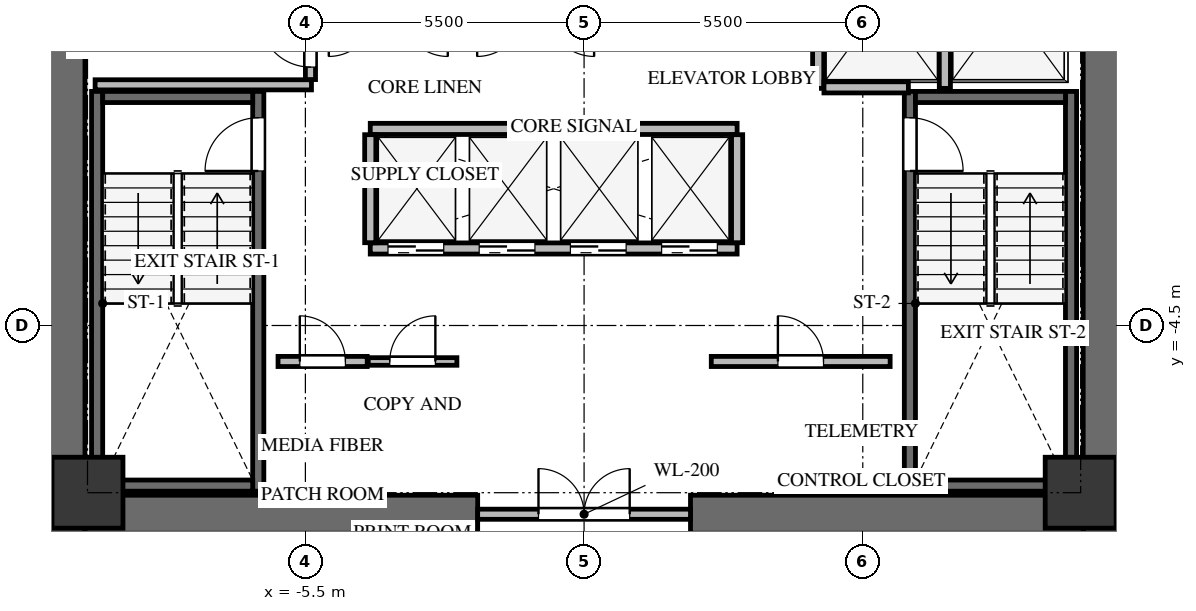
"""IFC4 building model, lengths in metres.
Left out: names, types, materials, properties, quantities, classifications, styles, units other than length and angle.
Written with IfcOpenShell. Run it as: python <this file> out.ifc"""

import sys

from ifc_helpers import new_model, si_unit, direction, frame, frame_2d, origin, origin_2d, place, context, subcontext, project, spatial, rectangle, extrude, source, transform, mapped, element, fill, save


model = new_model("IFC4")
c1 = context("Model", 3, precision=1e-05, world=origin(), true_north=direction((0.0, 1.0)))
c2 = subcontext(c1, "Body", "Model", "MODEL_VIEW")
j1 = project(units=[si_unit("LENGTHUNIT", "METRE"), si_unit("PLANEANGLEUNIT", "RADIAN")], contexts=[c1])
p1 = place(None, origin())
s1 = spatial("IfcSite", under=j1, at=p1, CompositionType="ELEMENT")
p2 = place(p1, origin())
s2 = spatial("IfcBuilding", under=s1, at=p2, CompositionType="ELEMENT")
p3 = place(p2, frame((0.0, 0.0, 97.5)))
s3 = spatial("IfcBuildingStorey", under=s2, at=p3, CompositionType="ELEMENT", Elevation=97.5)
for number, where, z_axis, x_axis in (
    (1, (-10.225, -8.6, 0.0), (0.0, 0.0, 1.0), (0.0, 1.0, 0.0)),
    (2, (10.225, -8.6, 0.0), (0.0, 0.0, 1.0), (0.0, 1.0, 0.0)),
):
    element("IfcWall", number, at=place(p3, frame(where, z_axis=z_axis, x_axis=x_axis)), inside=s3, PredefinedType="SHEAR", context=c2, shape_type="SweptSolid", body=[
        extrude(rectangle(XDim=17.2, YDim=0.75, at=frame_2d((8.6, 0.0))), origin(), (0.0, 0.0, 1.0), 3.3),
    ])
for number, where, z_axis, x_axis in (
    (3, (-9.85, -8.225, 0.0), (0.0, 0.0, 1.0), (1.0, 0.0, 0.0)),
    (4, (2.1, -8.225, 0.0), (0.0, 0.0, 1.0), (1.0, 0.0, 0.0)),
):
    element("IfcWall", number, at=place(p3, frame(where, z_axis=z_axis, x_axis=x_axis)), inside=s3, PredefinedType="SHEAR", context=c2, shape_type="SweptSolid", body=[
        extrude(rectangle(XDim=7.75, YDim=0.75, at=frame_2d((3.875, 0.0))), origin(), (0.0, 0.0, 1.0), 3.3),
    ])
p4 = place(p3, frame((-6.43, -7.77, -0.24), z_axis=(0.0, 0.0, 1.0), x_axis=(0.0, 1.0, 0.0)))
e5 = element("IfcWall", 5, at=p4, inside=s3, PredefinedType="SHEAR", context=c2, shape_type="SweptSolid", body=[
    extrude(rectangle(XDim=7.89, YDim=0.22, at=frame_2d((3.945, 0.0))), origin(), (0.0, 0.0, 1.0), 3.3),
])
p5 = place(p4, frame((6.32, 0.0, 0.0)))
e6 = element("IfcOpeningElement", 6, at=p5, cuts=e5, PredefinedType="OPENING", context=c2, shape_type="SweptSolid", body=[
    extrude(rectangle(XDim=1.05, YDim=2.15, at=frame_2d((0.525, 1.075))), frame((0.0, 0.12, 0.0), z_axis=(0.0, -1.0, 0.0), x_axis=(1.0, 0.0, 0.0)), (0.0, 0.0, 1.0), 0.24),
])
p6 = place(p3, frame((-9.61, 0.12, -0.24), z_axis=(0.0, 0.0, 1.0), x_axis=(0.0, -1.0, 0.0)))
e7 = element("IfcWall", 7, at=p6, inside=s3, PredefinedType="SHEAR", context=c2, shape_type="SweptSolid", body=[
    extrude(rectangle(XDim=7.89, YDim=0.22, at=frame_2d((3.945, 0.0))), origin(), (0.0, 0.0, 1.0), 3.3),
])
for number, where, z_axis, x_axis in (
    (8, (-9.5, -7.66, -0.24), (0.0, 0.0, 1.0), (1.0, 0.0, 0.0)),
    (9, (-6.54, 0.01, -0.24), (0.0, 0.0, 1.0), (-1.0, 0.0, 0.0)),
):
    element("IfcWall", number, at=place(p3, frame(where, z_axis=z_axis, x_axis=x_axis)), inside=s3, PredefinedType="SHEAR", context=c2, shape_type="SweptSolid", body=[
        extrude(rectangle(XDim=2.96, YDim=0.22, at=frame_2d((1.48, 0.0))), origin(), (0.0, 0.0, 1.0), 3.3),
    ])
p7 = place(p3, frame((9.61, -7.77, -0.24), z_axis=(0.0, 0.0, 1.0), x_axis=(0.0, 1.0, 0.0)))
e10 = element("IfcWall", 10, at=p7, inside=s3, PredefinedType="SHEAR", context=c2, shape_type="SweptSolid", body=[
    extrude(rectangle(XDim=7.89, YDim=0.22, at=frame_2d((3.945, 0.0))), origin(), (0.0, 0.0, 1.0), 3.3),
])
p8 = place(p3, frame((6.43, 0.12, -0.24), z_axis=(0.0, 0.0, 1.0), x_axis=(0.0, -1.0, 0.0)))
e11 = element("IfcWall", 11, at=p8, inside=s3, PredefinedType="SHEAR", context=c2, shape_type="SweptSolid", body=[
    extrude(rectangle(XDim=7.89, YDim=0.22, at=frame_2d((3.945, 0.0))), origin(), (0.0, 0.0, 1.0), 3.3),
])
p9 = place(p8, frame((0.52, 0.0, 0.0)))
e12 = element("IfcOpeningElement", 12, at=p9, cuts=e11, PredefinedType="OPENING", context=c2, shape_type="SweptSolid", body=[
    extrude(rectangle(XDim=1.05, YDim=2.15, at=frame_2d((0.525, 1.075))), frame((0.0, 0.12, 0.0), z_axis=(0.0, -1.0, 0.0), x_axis=(1.0, 0.0, 0.0)), (0.0, 0.0, 1.0), 0.24),
])
for number, where, z_axis, x_axis in (
    (13, (6.54, -7.66, -0.24), (0.0, 0.0, 1.0), (1.0, 0.0, 0.0)),
    (14, (9.5, 0.01, -0.24), (0.0, 0.0, 1.0), (-1.0, 0.0, 0.0)),
):
    element("IfcWall", number, at=place(p3, frame(where, z_axis=z_axis, x_axis=x_axis)), inside=s3, PredefinedType="SHEAR", context=c2, shape_type="SweptSolid", body=[
        extrude(rectangle(XDim=2.96, YDim=0.22, at=frame_2d((1.48, 0.0))), origin(), (0.0, 0.0, 1.0), 3.3),
    ])
m1 = source(origin(), c2, "Body", "SweptSolid", [
    extrude(rectangle(XDim=1.4, YDim=1.4, at=origin_2d()), origin(), (0.0, 0.0, 1.0), 3.3),
])
for number, where, z_axis, x_axis in (
    (15, (-9.8, -7.8, -0.24), (0.0, 0.0, 1.0), (1.0, 0.0, 0.0)),
    (16, (9.8, -7.8, -0.24), (0.0, 0.0, 1.0), (1.0, 0.0, 0.0)),
):
    element("IfcColumn", number, at=place(p3, frame(where, z_axis=z_axis, x_axis=x_axis)), inside=s3, PredefinedType="COLUMN", context=c2, shape_type="MappedRepresentation", body=[
        mapped(m1, transform((0.0, 0.0, 0.0), x_axis=(1.0, 0.0, 0.0), y_axis=(0.0, 1.0, 0.0), z_axis=(0.0, 0.0, 1.0), scale=1.0)),
    ])
p10 = place(p3, frame((-2.1, -8.225, 0.0), z_axis=(0.0, 0.0, 1.0), x_axis=(1.0, 0.0, 0.0)))
e17 = element("IfcWall", 17, at=p10, inside=s3, PredefinedType="SOLIDWALL", context=c2, shape_type="SweptSolid", body=[
    extrude(rectangle(XDim=4.2, YDim=0.2, at=frame_2d((2.1, 0.0))), origin(), (0.0, 0.0, 1.0), 3.045),
])
p11 = place(p10, frame((1.2, 0.0, 0.0)))
e18 = element("IfcOpeningElement", 18, at=p11, cuts=e17, PredefinedType="OPENING", context=c2, shape_type="SweptSolid", body=[
    extrude(rectangle(XDim=1.8, YDim=2.15, at=frame_2d((0.9, 1.075))), frame((0.0, 0.11, 0.0), z_axis=(0.0, -1.0, 0.0), x_axis=(1.0, 0.0, 0.0)), (0.0, 0.0, 1.0), 0.22),
])
p12 = place(p3, frame((-9.65, 0.25, 0.0), z_axis=(0.0, 0.0, 1.0), x_axis=(1.0, 0.0, 0.0)))
e19 = element("IfcWall", 19, at=p12, inside=s3, PredefinedType="SOLIDWALL", context=c2, shape_type="SweptSolid", body=[
    extrude(rectangle(XDim=4.27, YDim=0.2, at=frame_2d((2.135, 0.0))), origin(), (0.0, 0.0, 1.0), 3.045),
])
p13 = place(p3, frame((-5.4, 0.354, 0.0), z_axis=(0.0, 0.0, 1.0), x_axis=(0.0, 1.0, 0.0)))
e20 = element("IfcWall", 20, at=p13, inside=s3, PredefinedType="SOLIDWALL", context=c2, shape_type="SweptSolid", body=[
    extrude(rectangle(XDim=4.026, YDim=0.2, at=frame_2d((2.013, 0.0))), origin(), (0.0, 0.0, 1.0), 3.045),
])
p14 = place(p13, frame((0.246, 0.0, 0.0)))
e21 = element("IfcOpeningElement", 21, at=p14, cuts=e20, PredefinedType="OPENING", context=c2, shape_type="SweptSolid", body=[
    extrude(rectangle(XDim=1.0, YDim=2.15, at=frame_2d((0.5, 1.075))), frame((0.0, 0.11, 0.0), z_axis=(0.0, -1.0, 0.0), x_axis=(1.0, 0.0, 0.0)), (0.0, 0.0, 1.0), 0.22),
])
for number, where, z_axis, x_axis in (
    (22, (4.62, 0.18, 0.0), (0.0, 0.0, 1.0), (0.0, 1.0, 0.0)),
    (23, (7.12, 0.18, 0.0), (0.0, 0.0, 1.0), (0.0, 1.0, 0.0)),
):
    element("IfcWall", number, at=place(p3, frame(where, z_axis=z_axis, x_axis=x_axis)), inside=s3, PredefinedType="SOLIDWALL", context=c2, shape_type="SweptSolid", body=[
        extrude(rectangle(XDim=3.186, YDim=0.22, at=frame_2d((1.593, 0.0))), origin(), (0.0, 0.0, 1.0), 3.045),
    ])
p15 = place(p3, frame((4.734, 0.2, 0.0), z_axis=(0.0, 0.0, 1.0), x_axis=(1.0, 0.0, 0.0)))
e24 = element("IfcWall", 24, at=p15, inside=s3, PredefinedType="SOLIDWALL", context=c2, shape_type="SweptSolid", body=[
    extrude(rectangle(XDim=1.666, YDim=0.22, at=frame_2d((0.833, 0.0))), origin(), (0.0, 0.0, 1.0), 3.045),
])
p16 = place(p3, frame((-4.22, -2.98, 0.0), z_axis=(0.0, 0.0, 1.0), x_axis=(1.0, 0.0, 0.0)))
e25 = element("IfcWall", 25, at=p16, inside=s3, PredefinedType="SOLIDWALL", context=c2, shape_type="SweptSolid", body=[
    extrude(rectangle(XDim=7.24, YDim=0.22, at=frame_2d((3.62, 0.0))), origin(), (0.0, 0.0, 1.0), 3.045),
])
p17 = place(p16, frame((0.35, 0.0, 0.0)))
e26 = element("IfcOpeningElement", 26, at=p17, cuts=e25, PredefinedType="OPENING", context=c2, shape_type="SweptSolid", body=[
    extrude(rectangle(XDim=1.1, YDim=2.15, at=frame_2d((0.55, 1.075))), frame((0.0, 0.12, 0.0), z_axis=(0.0, -1.0, 0.0), x_axis=(1.0, 0.0, 0.0)), (0.0, 0.0, 1.0), 0.24),
])
p18 = place(p16, frame((2.15, 0.0, 0.0)))
e27 = element("IfcOpeningElement", 27, at=p18, cuts=e25, PredefinedType="OPENING", context=c2, shape_type="SweptSolid", body=[
    extrude(rectangle(XDim=1.1, YDim=2.15, at=frame_2d((0.55, 1.075))), frame((0.0, 0.12, 0.0), z_axis=(0.0, -1.0, 0.0), x_axis=(1.0, 0.0, 0.0)), (0.0, 0.0, 1.0), 0.24),
])
p19 = place(p16, frame((3.95, 0.0, 0.0)))
e28 = element("IfcOpeningElement", 28, at=p19, cuts=e25, PredefinedType="OPENING", context=c2, shape_type="SweptSolid", body=[
    extrude(rectangle(XDim=1.1, YDim=2.15, at=frame_2d((0.55, 1.075))), frame((0.0, 0.12, 0.0), z_axis=(0.0, -1.0, 0.0), x_axis=(1.0, 0.0, 0.0)), (0.0, 0.0, 1.0), 0.24),
])
p20 = place(p16, frame((5.75, 0.0, 0.0)))
e29 = element("IfcOpeningElement", 29, at=p20, cuts=e25, PredefinedType="OPENING", context=c2, shape_type="SweptSolid", body=[
    extrude(rectangle(XDim=1.1, YDim=2.15, at=frame_2d((0.55, 1.075))), frame((0.0, 0.12, 0.0), z_axis=(0.0, -1.0, 0.0), x_axis=(1.0, 0.0, 0.0)), (0.0, 0.0, 1.0), 0.24),
])
p21 = place(p3, frame((-4.22, -0.62, 0.0), z_axis=(0.0, 0.0, 1.0), x_axis=(1.0, 0.0, 0.0)))
e30 = element("IfcWall", 30, at=p21, inside=s3, PredefinedType="SOLIDWALL", context=c2, shape_type="SweptSolid", body=[
    extrude(rectangle(XDim=7.24, YDim=0.22, at=frame_2d((3.62, 0.0))), origin(), (0.0, 0.0, 1.0), 3.045),
])
for number, where, z_axis, x_axis in (
    (31, (-4.22, -2.866, 0.0), (0.0, 0.0, 1.0), (0.0, 1.0, 0.0)),
    (32, (3.02, -2.866, 0.0), (0.0, 0.0, 1.0), (0.0, 1.0, 0.0)),
):
    element("IfcWall", number, at=place(p3, frame(where, z_axis=z_axis, x_axis=x_axis)), inside=s3, PredefinedType="SOLIDWALL", context=c2, shape_type="SweptSolid", body=[
        extrude(rectangle(XDim=2.132, YDim=0.22, at=frame_2d((1.066, 0.0))), origin(), (0.0, 0.0, 1.0), 3.045),
    ])
p22 = place(p3, frame((-6.04, -5.21, 0.0), z_axis=(0.0, 0.0, 1.0), x_axis=(1.0, 0.0, 0.0)))
e33 = element("IfcWall", 33, at=p22, inside=s3, PredefinedType="SOLIDWALL", context=c2, shape_type="SweptSolid", body=[
    extrude(rectangle(XDim=1.76, YDim=0.2, at=frame_2d((0.88, 0.0))), origin(), (0.0, 0.0, 1.0), 3.045),
])
p23 = place(p22, frame((0.43, 0.0, 0.0)))
e34 = element("IfcOpeningElement", 34, at=p23, cuts=e33, PredefinedType="OPENING", context=c2, shape_type="SweptSolid", body=[
    extrude(rectangle(XDim=0.9, YDim=2.05, at=frame_2d((0.45, 1.025))), frame((0.0, 0.11, 0.0), z_axis=(0.0, -1.0, 0.0), x_axis=(1.0, 0.0, 0.0)), (0.0, 0.0, 1.0), 0.22),
])
p24 = place(p3, frame((-4.26, -5.21, 0.0), z_axis=(0.0, 0.0, 1.0), x_axis=(1.0, 0.0, 0.0)))
e35 = element("IfcWall", 35, at=p24, inside=s3, PredefinedType="PARTITIONING", context=c2, shape_type="SweptSolid", body=[
    extrude(rectangle(XDim=1.75, YDim=0.15, at=frame_2d((0.875, 0.0))), origin(), (0.0, 0.0, 1.0), 3.045),
])
p25 = place(p24, frame((0.425, 0.0, 0.0)))
e36 = element("IfcOpeningElement", 36, at=p25, cuts=e35, PredefinedType="OPENING", context=c2, shape_type="SweptSolid", body=[
    extrude(rectangle(XDim=0.9, YDim=2.05, at=frame_2d((0.45, 1.025))), frame((0.0, 0.085, 0.0), z_axis=(0.0, -1.0, 0.0), x_axis=(1.0, 0.0, 0.0)), (0.0, 0.0, 1.0), 0.17),
])
p26 = place(p3, frame((2.51, -5.21, 0.0), z_axis=(0.0, 0.0, 1.0), x_axis=(1.0, 0.0, 0.0)))
e37 = element("IfcWall", 37, at=p26, inside=s3, PredefinedType="SOLIDWALL", context=c2, shape_type="SweptSolid", body=[
    extrude(rectangle(XDim=3.53, YDim=0.2, at=frame_2d((1.765, 0.0))), origin(), (0.0, 0.0, 1.0), 3.045),
])
p27 = place(p26, frame((1.315, 0.0, 0.0)))
e38 = element("IfcOpeningElement", 38, at=p27, cuts=e37, PredefinedType="OPENING", context=c2, shape_type="SweptSolid", body=[
    extrude(rectangle(XDim=0.9, YDim=2.05, at=frame_2d((0.45, 1.025))), frame((0.0, 0.11, 0.0), z_axis=(0.0, -1.0, 0.0), x_axis=(1.0, 0.0, 0.0)), (0.0, 0.0, 1.0), 0.22),
])
m2 = source(origin(), c2, "Body", "SweptSolid", [
    extrude(rectangle(XDim=1.05, YDim=2.15, at=frame_2d((0.525, 1.075))), frame((0.0, 0.025, 0.0), z_axis=(0.0, -1.0, 0.0), x_axis=(1.0, 0.0, 0.0)), (0.0, 0.0, 1.0), 0.05),
])
p28 = place(p5, origin())
e39 = element("IfcDoor", 39, at=p28, inside=s3, OperationType="SINGLE_SWING_LEFT", PredefinedType="DOOR", context=c2, shape_type="MappedRepresentation", body=[
    mapped(m2, transform((0.0, 0.0, 0.0), x_axis=(1.0, 0.0, 0.0), y_axis=(0.0, 1.0, 0.0), z_axis=(0.0, 0.0, 1.0), scale=1.0)),
])
fill(e6, e39)
m3 = source(origin(), c2, "Body", "SweptSolid", [
    extrude(rectangle(XDim=1.05, YDim=2.15, at=frame_2d((0.525, 1.075))), frame((0.0, 0.025, 0.0), z_axis=(0.0, -1.0, 0.0), x_axis=(1.0, 0.0, 0.0)), (0.0, 0.0, 1.0), 0.05),
])
p29 = place(p9, origin())
e40 = element("IfcDoor", 40, at=p29, inside=s3, OperationType="SINGLE_SWING_RIGHT", PredefinedType="DOOR", context=c2, shape_type="MappedRepresentation", body=[
    mapped(m3, transform((0.0, 0.0, 0.0), x_axis=(1.0, 0.0, 0.0), y_axis=(0.0, 1.0, 0.0), z_axis=(0.0, 0.0, 1.0), scale=1.0)),
])
fill(e12, e40)
m4 = source(origin(), c2, "Body", "SweptSolid", [
    extrude(rectangle(XDim=1.8, YDim=2.15, at=frame_2d((0.9, 1.075))), frame((0.0, 0.025, 0.0), z_axis=(0.0, -1.0, 0.0), x_axis=(1.0, 0.0, 0.0)), (0.0, 0.0, 1.0), 0.05),
])
p30 = place(p11, origin())
e41 = element("IfcDoor", 41, at=p30, inside=s3, OperationType="DOUBLE_DOOR_SINGLE_SWING", PredefinedType="DOOR", context=c2, shape_type="MappedRepresentation", body=[
    mapped(m4, transform((0.0, 0.0, 0.0), x_axis=(1.0, 0.0, 0.0), y_axis=(0.0, 1.0, 0.0), z_axis=(0.0, 0.0, 1.0), scale=1.0)),
])
fill(e18, e41)
m5 = source(origin(), c2, "Body", "SweptSolid", [
    extrude(rectangle(XDim=1.0, YDim=2.15, at=frame_2d((0.5, 1.075))), frame((0.0, 0.025, 0.0), z_axis=(0.0, -1.0, 0.0), x_axis=(1.0, 0.0, 0.0)), (0.0, 0.0, 1.0), 0.05),
])
p31 = place(p14, origin())
e42 = element("IfcDoor", 42, at=p31, inside=s3, OperationType="SINGLE_SWING_RIGHT", PredefinedType="DOOR", context=c2, shape_type="MappedRepresentation", body=[
    mapped(m5, transform((0.0, 0.0, 0.0), x_axis=(1.0, 0.0, 0.0), y_axis=(0.0, 1.0, 0.0), z_axis=(0.0, 0.0, 1.0), scale=1.0)),
])
fill(e21, e42)
m6 = source(origin(), c2, "Body", "SweptSolid", [
    extrude(rectangle(XDim=1.1, YDim=2.15, at=frame_2d((0.55, 1.075))), frame((0.0, 0.025, 0.0), z_axis=(0.0, -1.0, 0.0), x_axis=(1.0, 0.0, 0.0)), (0.0, 0.0, 1.0), 0.05),
])
p32 = place(p17, origin())
e43 = element("IfcDoor", 43, at=p32, inside=s3, OperationType="DOUBLE_DOOR_SLIDING", PredefinedType="DOOR", context=c2, shape_type="MappedRepresentation", body=[
    mapped(m6, transform((0.0, 0.0, 0.0), x_axis=(1.0, 0.0, 0.0), y_axis=(0.0, 1.0, 0.0), z_axis=(0.0, 0.0, 1.0), scale=1.0)),
])
fill(e26, e43)
p33 = place(p18, origin())
e44 = element("IfcDoor", 44, at=p33, inside=s3, OperationType="DOUBLE_DOOR_SLIDING", PredefinedType="DOOR", context=c2, shape_type="MappedRepresentation", body=[
    mapped(m6, transform((0.0, 0.0, 0.0), x_axis=(1.0, 0.0, 0.0), y_axis=(0.0, 1.0, 0.0), z_axis=(0.0, 0.0, 1.0), scale=1.0)),
])
fill(e27, e44)
p34 = place(p19, origin())
e45 = element("IfcDoor", 45, at=p34, inside=s3, OperationType="DOUBLE_DOOR_SLIDING", PredefinedType="DOOR", context=c2, shape_type="MappedRepresentation", body=[
    mapped(m6, transform((0.0, 0.0, 0.0), x_axis=(1.0, 0.0, 0.0), y_axis=(0.0, 1.0, 0.0), z_axis=(0.0, 0.0, 1.0), scale=1.0)),
])
fill(e28, e45)
p35 = place(p20, origin())
e46 = element("IfcDoor", 46, at=p35, inside=s3, OperationType="DOUBLE_DOOR_SLIDING", PredefinedType="DOOR", context=c2, shape_type="MappedRepresentation", body=[
    mapped(m6, transform((0.0, 0.0, 0.0), x_axis=(1.0, 0.0, 0.0), y_axis=(0.0, 1.0, 0.0), z_axis=(0.0, 0.0, 1.0), scale=1.0)),
])
fill(e29, e46)
m7 = source(origin(), c2, "Body", "SweptSolid", [
    extrude(rectangle(XDim=0.9, YDim=2.05, at=frame_2d((0.45, 1.025))), frame((0.0, 0.025, 0.0), z_axis=(0.0, -1.0, 0.0), x_axis=(1.0, 0.0, 0.0)), (0.0, 0.0, 1.0), 0.05),
])
p36 = place(p23, origin())
e47 = element("IfcDoor", 47, at=p36, inside=s3, OperationType="SINGLE_SWING_LEFT", PredefinedType="DOOR", context=c2, shape_type="MappedRepresentation", body=[
    mapped(m7, transform((0.0, 0.0, 0.0), x_axis=(1.0, 0.0, 0.0), y_axis=(0.0, 1.0, 0.0), z_axis=(0.0, 0.0, 1.0), scale=1.0)),
])
fill(e34, e47)
m8 = source(origin(), c2, "Body", "SweptSolid", [
    extrude(rectangle(XDim=0.9, YDim=2.05, at=frame_2d((0.45, 1.025))), frame((0.0, 0.025, 0.0), z_axis=(0.0, -1.0, 0.0), x_axis=(1.0, 0.0, 0.0)), (0.0, 0.0, 1.0), 0.05),
])
p37 = place(p25, origin())
e48 = element("IfcDoor", 48, at=p37, inside=s3, OperationType="SINGLE_SWING_RIGHT", PredefinedType="DOOR", context=c2, shape_type="MappedRepresentation", body=[
    mapped(m8, transform((0.0, 0.0, 0.0), x_axis=(1.0, 0.0, 0.0), y_axis=(0.0, 1.0, 0.0), z_axis=(0.0, 0.0, 1.0), scale=1.0)),
])
fill(e36, e48)
p38 = place(p27, origin())
e49 = element("IfcDoor", 49, at=p38, inside=s3, OperationType="SINGLE_SWING_LEFT", PredefinedType="DOOR", context=c2, shape_type="MappedRepresentation", body=[
    mapped(m7, transform((0.0, 0.0, 0.0), x_axis=(1.0, 0.0, 0.0), y_axis=(0.0, 1.0, 0.0), z_axis=(0.0, 0.0, 1.0), scale=1.0)),
])
fill(e38, e49)
save(model, sys.argv[1])
